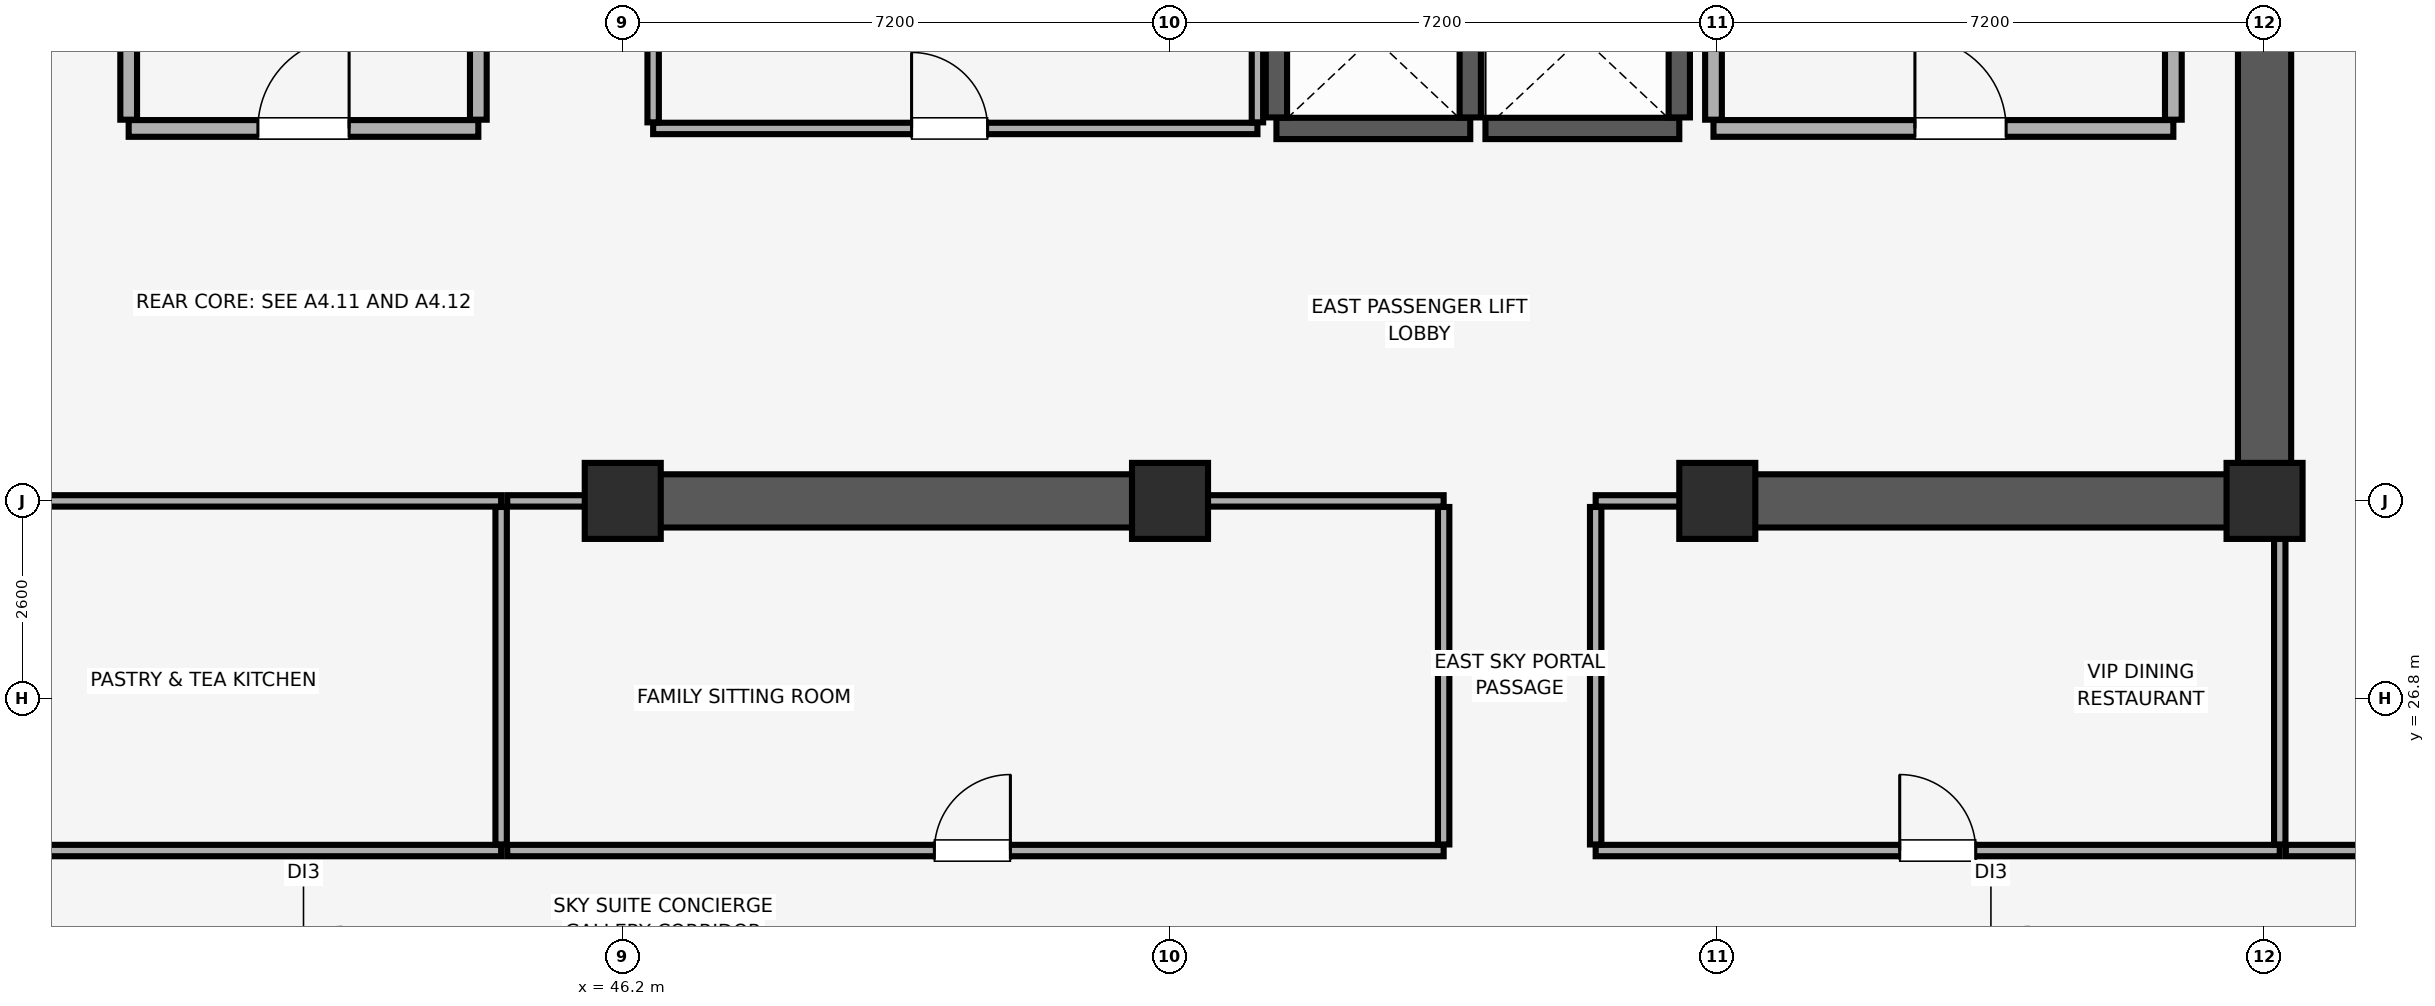
"""IFC4 building model, lengths in metres.
Left out: names, types, materials, properties, quantities, classifications, styles, units other than length and angle.
Written with IfcOpenShell. Run it as: python <this file> out.ifc"""

import sys

from ifc_helpers import new_model, si_unit, direction, frame, frame_2d, origin, origin_2d, place, context, subcontext, project, spatial, rectangle, extrude, element, fill, save


model = new_model("IFC4")
c1 = context("Model", 3, precision=1e-05, world=origin(), true_north=direction((0.0, 1.0)))
c2 = subcontext(c1, "Body", "Model", "MODEL_VIEW")
j1 = project(units=[si_unit("LENGTHUNIT", "METRE"), si_unit("PLANEANGLEUNIT", "RADIAN")], contexts=[c1])
p1 = place(None, origin())
s1 = spatial("IfcSite", under=j1, at=p1, CompositionType="ELEMENT")
p2 = place(p1, origin())
s2 = spatial("IfcBuilding", under=s1, at=p2, CompositionType="ELEMENT")
p3 = place(p2, frame((0.0, 0.0, 290.3)))
s3 = spatial("IfcBuildingStorey", under=s2, at=p3, CompositionType="ELEMENT", Elevation=290.3)
for number, where, z_axis, x_axis in (
    (1, (46.2, 29.4, 0.0), (0.0, 0.0, 1.0), (1.0, 0.0, 0.0)),
    (2, (53.4, 29.4, 0.0), (0.0, 0.0, 1.0), (1.0, 0.0, 0.0)),
    (3, (60.6, 29.4, 0.0), (0.0, 0.0, 1.0), (1.0, 0.0, 0.0)),
    (4, (67.8, 29.4, 0.0), (0.0, 0.0, 1.0), (1.0, 0.0, 0.0)),
):
    element("IfcColumn", number, at=place(p3, frame(where, z_axis=z_axis, x_axis=x_axis)), inside=s3, PredefinedType="COLUMN", context=c2, shape_type="SweptSolid", body=[
        extrude(rectangle(XDim=1.0, YDim=1.0, at=origin_2d()), origin(), (0.0, 0.0, 1.0), 4.02),
    ])
p4 = place(p3, frame((67.8, 29.4, 0.0), z_axis=(0.0, 0.0, 1.0), x_axis=(0.0, 1.0, 0.0)))
e5 = element("IfcWall", 5, at=p4, inside=s3, PredefinedType="SHEAR", context=c2, shape_type="SweptSolid", body=[
    extrude(rectangle(XDim=19.2, YDim=0.7, at=frame_2d((9.6, 0.0))), origin(), (0.0, 0.0, 1.0), 4.02),
])
p5 = place(p3, frame((46.0, 29.4, 0.0), z_axis=(0.0, 0.0, 1.0), x_axis=(1.0, 0.0, 0.0)))
e6 = element("IfcWall", 6, at=p5, inside=s3, PredefinedType="SHEAR", context=c2, shape_type="SweptSolid", body=[
    extrude(rectangle(XDim=7.6, YDim=0.7, at=frame_2d((3.8, 0.0))), origin(), (0.0, 0.0, 1.0), 4.02),
])
p6 = place(p3, frame((60.4, 29.4, 0.0), z_axis=(0.0, 0.0, 1.0), x_axis=(1.0, 0.0, 0.0)))
e7 = element("IfcWall", 7, at=p6, inside=s3, PredefinedType="SHEAR", context=c2, shape_type="SweptSolid", body=[
    extrude(rectangle(XDim=7.045, YDim=0.7, at=frame_2d((3.522, 0.0))), origin(), (0.0, 0.0, 1.0), 4.02),
])
p7 = place(p3, frame((54.8, 34.3, 0.0), z_axis=(0.0, 0.0, 1.0), x_axis=(1.0, 0.0, 0.0)))
e8 = element("IfcWall", 8, at=p7, inside=s3, PredefinedType="SHEAR", context=c2, shape_type="SweptSolid", body=[
    extrude(rectangle(XDim=2.55, YDim=0.28, at=frame_2d((1.275, 0.0))), origin(), (0.0, 0.0, 1.0), 4.02),
])
for number, where, z_axis, x_axis in (
    (9, (54.8, 34.445, 0.0), (0.0, 0.0, 1.0), (0.0, 1.0, 0.0)),
    (10, (57.35, 34.445, 0.0), (0.0, 0.0, 1.0), (0.0, 1.0, 0.0)),
):
    element("IfcWall", number, at=place(p3, frame(where, z_axis=z_axis, x_axis=x_axis)), inside=s3, PredefinedType="SHEAR", context=c2, shape_type="SweptSolid", body=[
        extrude(rectangle(XDim=2.11, YDim=0.28, at=frame_2d((1.055, 0.0))), origin(), (0.0, 0.0, 1.0), 4.02),
    ])
p8 = place(p3, frame((57.55, 34.3, 0.0), z_axis=(0.0, 0.0, 1.0), x_axis=(1.0, 0.0, 0.0)))
e11 = element("IfcWall", 11, at=p8, inside=s3, PredefinedType="SHEAR", context=c2, shape_type="SweptSolid", body=[
    extrude(rectangle(XDim=2.55, YDim=0.28, at=frame_2d((1.275, 0.0))), origin(), (0.0, 0.0, 1.0), 4.02),
])
p9 = place(p3, frame((60.1, 34.445, 0.0), z_axis=(0.0, 0.0, 1.0), x_axis=(0.0, 1.0, 0.0)))
e12 = element("IfcWall", 12, at=p9, inside=s3, PredefinedType="SHEAR", context=c2, shape_type="SweptSolid", body=[
    extrude(rectangle(XDim=2.11, YDim=0.28, at=frame_2d((1.055, 0.0))), origin(), (0.0, 0.0, 1.0), 4.02),
])
p10 = place(p3, frame((60.55, 34.3, 0.0), z_axis=(0.0, 0.0, 1.0), x_axis=(1.0, 0.0, 0.0)))
e13 = element("IfcWall", 13, at=p10, inside=s3, PredefinedType="PARTITIONING", context=c2, shape_type="SweptSolid", body=[
    extrude(rectangle(XDim=6.05, YDim=0.22, at=frame_2d((3.025, 0.0))), origin(), (0.0, 0.0, 1.0), 4.02),
])
p11 = place(p10, frame((2.65, 0.0, 0.0)))
e14 = element("IfcOpeningElement", 14, at=p11, cuts=e13, PredefinedType="OPENING", context=c2, shape_type="SweptSolid", body=[
    extrude(rectangle(XDim=1.2, YDim=2.15, at=frame_2d((0.6, 1.075))), frame((0.0, 0.12, 0.0), z_axis=(0.0, -1.0, 0.0), x_axis=(1.0, 0.0, 0.0)), (0.0, 0.0, 1.0), 0.24),
])
p12 = place(p3, frame((60.55, 34.415, 0.0), z_axis=(0.0, 0.0, 1.0), x_axis=(0.0, 1.0, 0.0)))
e15 = element("IfcWall", 15, at=p12, inside=s3, PredefinedType="PARTITIONING", context=c2, shape_type="SweptSolid", body=[
    extrude(rectangle(XDim=5.64, YDim=0.22, at=frame_2d((2.82, 0.0))), origin(), (0.0, 0.0, 1.0), 4.02),
])
p13 = place(p3, frame((66.6, 34.415, 0.0), z_axis=(0.0, 0.0, 1.0), x_axis=(0.0, 1.0, 0.0)))
e16 = element("IfcWall", 16, at=p13, inside=s3, PredefinedType="PARTITIONING", context=c2, shape_type="SweptSolid", body=[
    extrude(rectangle(XDim=5.43, YDim=0.22, at=frame_2d((2.715, 0.0))), origin(), (0.0, 0.0, 1.0), 4.02),
])
p14 = place(p3, frame((39.7, 34.3, 0.0), z_axis=(0.0, 0.0, 1.0), x_axis=(1.0, 0.0, 0.0)))
e17 = element("IfcWall", 17, at=p14, inside=s3, PredefinedType="PARTITIONING", context=c2, shape_type="SweptSolid", body=[
    extrude(rectangle(XDim=4.6, YDim=0.22, at=frame_2d((2.3, 0.0))), origin(), (0.0, 0.0, 1.0), 4.02),
])
p15 = place(p14, frame((1.7, 0.0, 0.0)))
e18 = element("IfcOpeningElement", 18, at=p15, cuts=e17, PredefinedType="OPENING", context=c2, shape_type="SweptSolid", body=[
    extrude(rectangle(XDim=1.2, YDim=2.15, at=frame_2d((0.6, 1.075))), frame((0.0, 0.12, 0.0), z_axis=(0.0, -1.0, 0.0), x_axis=(1.0, 0.0, 0.0)), (0.0, 0.0, 1.0), 0.24),
])
for number, where, z_axis, x_axis in (
    (19, (39.7, 34.415, 0.0), (0.0, 0.0, 1.0), (0.0, 1.0, 0.0)),
    (20, (44.3, 34.415, 0.0), (0.0, 0.0, 1.0), (0.0, 1.0, 0.0)),
):
    element("IfcWall", number, at=place(p3, frame(where, z_axis=z_axis, x_axis=x_axis)), inside=s3, PredefinedType="PARTITIONING", context=c2, shape_type="SweptSolid", body=[
        extrude(rectangle(XDim=5.785, YDim=0.22, at=frame_2d((2.893, 0.0))), origin(), (0.0, 0.0, 1.0), 4.02),
    ])
p16 = place(p3, frame((46.6, 34.3, 0.0), z_axis=(0.0, 0.0, 1.0), x_axis=(1.0, 0.0, 0.0)))
e21 = element("IfcWall", 21, at=p16, inside=s3, PredefinedType="PARTITIONING", context=c2, shape_type="SweptSolid", body=[
    extrude(rectangle(XDim=7.95, YDim=0.15, at=frame_2d((3.975, 0.0))), origin(), (0.0, 0.0, 1.0), 4.02),
])
p17 = place(p16, frame((3.4, 0.0, 0.0)))
e22 = element("IfcOpeningElement", 22, at=p17, cuts=e21, PredefinedType="OPENING", context=c2, shape_type="SweptSolid", body=[
    extrude(rectangle(XDim=1.0, YDim=2.15, at=frame_2d((0.5, 1.075))), frame((0.0, 0.085, 0.0), z_axis=(0.0, -1.0, 0.0), x_axis=(1.0, 0.0, 0.0)), (0.0, 0.0, 1.0), 0.17),
])
for number, where, z_axis, x_axis in (
    (23, (46.6, 34.38, 0.0), (0.0, 0.0, 1.0), (0.0, 1.0, 0.0)),
    (24, (54.55, 34.38, 0.0), (0.0, 0.0, 1.0), (0.0, 1.0, 0.0)),
):
    element("IfcWall", number, at=place(p3, frame(where, z_axis=z_axis, x_axis=x_axis)), inside=s3, PredefinedType="PARTITIONING", context=c2, shape_type="SweptSolid", body=[
        extrude(rectangle(XDim=4.94, YDim=0.15, at=frame_2d((2.47, 0.0))), origin(), (0.0, 0.0, 1.0), 4.02),
    ])
p18 = place(p3, frame((27.0, 24.8, 0.0), z_axis=(0.0, 0.0, 1.0), x_axis=(1.0, 0.0, 0.0)))
e25 = element("IfcWall", 25, at=p18, inside=s3, PredefinedType="PARTITIONING", context=c2, shape_type="SweptSolid", body=[
    extrude(rectangle(XDim=17.6, YDim=0.15, at=frame_2d((8.8, 0.0))), origin(), (0.0, 0.0, 1.0), 4.02),
])
p19 = place(p18, frame((8.3, 0.0, 0.0)))
e26 = element("IfcOpeningElement", 26, at=p19, cuts=e25, PredefinedType="OPENING", context=c2, shape_type="SweptSolid", body=[
    extrude(rectangle(XDim=1.0, YDim=2.15, at=frame_2d((0.5, 1.075))), frame((0.0, 0.085, 0.0), z_axis=(0.0, -1.0, 0.0), x_axis=(1.0, 0.0, 0.0)), (0.0, 0.0, 1.0), 0.17),
])
p20 = place(p3, frame((38.01, 29.4, 0.0), z_axis=(0.0, 0.0, 1.0), x_axis=(1.0, 0.0, 0.0)))
e27 = element("IfcWall", 27, at=p20, inside=s3, PredefinedType="PARTITIONING", context=c2, shape_type="SweptSolid", body=[
    extrude(rectangle(XDim=6.59, YDim=0.15, at=frame_2d((3.295, 0.0))), origin(), (0.0, 0.0, 1.0), 2.92),
])
p21 = place(p3, frame((44.6, 24.88, 0.0), z_axis=(0.0, 0.0, 1.0), x_axis=(0.0, 1.0, 0.0)))
e28 = element("IfcWall", 28, at=p21, inside=s3, PredefinedType="PARTITIONING", context=c2, shape_type="SweptSolid", body=[
    extrude(rectangle(XDim=4.44, YDim=0.15, at=frame_2d((2.22, 0.0))), origin(), (0.0, 0.0, 1.0), 4.02),
])
p22 = place(p3, frame((44.68, 24.8, 0.0), z_axis=(0.0, 0.0, 1.0), x_axis=(1.0, 0.0, 0.0)))
e29 = element("IfcWall", 29, at=p22, inside=s3, PredefinedType="PARTITIONING", context=c2, shape_type="SweptSolid", body=[
    extrude(rectangle(XDim=12.32, YDim=0.15, at=frame_2d((6.16, 0.0))), origin(), (0.0, 0.0, 1.0), 4.02),
])
p23 = place(p22, frame((5.62, 0.0, 0.0)))
e30 = element("IfcOpeningElement", 30, at=p23, cuts=e29, PredefinedType="OPENING", context=c2, shape_type="SweptSolid", body=[
    extrude(rectangle(XDim=1.0, YDim=2.15, at=frame_2d((0.5, 1.075))), frame((0.0, 0.085, 0.0), z_axis=(0.0, -1.0, 0.0), x_axis=(1.0, 0.0, 0.0)), (0.0, 0.0, 1.0), 0.17),
])
p24 = place(p3, frame((44.68, 29.4, 0.0), z_axis=(0.0, 0.0, 1.0), x_axis=(1.0, 0.0, 0.0)))
e31 = element("IfcWall", 31, at=p24, inside=s3, PredefinedType="PARTITIONING", context=c2, shape_type="SweptSolid", body=[
    extrude(rectangle(XDim=1.31, YDim=0.15, at=frame_2d((0.655, 0.0))), origin(), (0.0, 0.0, 1.0), 2.92),
])
p25 = place(p3, frame((53.61, 29.4, 0.0), z_axis=(0.0, 0.0, 1.0), x_axis=(1.0, 0.0, 0.0)))
e32 = element("IfcWall", 32, at=p25, inside=s3, PredefinedType="PARTITIONING", context=c2, shape_type="SweptSolid", body=[
    extrude(rectangle(XDim=3.39, YDim=0.15, at=frame_2d((1.695, 0.0))), origin(), (0.0, 0.0, 1.0), 2.92),
])
p26 = place(p3, frame((57.0, 24.88, 0.0), z_axis=(0.0, 0.0, 1.0), x_axis=(0.0, 1.0, 0.0)))
e33 = element("IfcWall", 33, at=p26, inside=s3, PredefinedType="PARTITIONING", context=c2, shape_type="SweptSolid", body=[
    extrude(rectangle(XDim=4.44, YDim=0.15, at=frame_2d((2.22, 0.0))), origin(), (0.0, 0.0, 1.0), 3.66),
])
p27 = place(p3, frame((59.0, 24.8, 0.0), z_axis=(0.0, 0.0, 1.0), x_axis=(1.0, 0.0, 0.0)))
e34 = element("IfcWall", 34, at=p27, inside=s3, PredefinedType="PARTITIONING", context=c2, shape_type="SweptSolid", body=[
    extrude(rectangle(XDim=9.0, YDim=0.15, at=frame_2d((4.5, 0.0))), origin(), (0.0, 0.0, 1.0), 4.02),
])
p28 = place(p27, frame((4.0, 0.0, 0.0)))
e35 = element("IfcOpeningElement", 35, at=p28, cuts=e34, PredefinedType="OPENING", context=c2, shape_type="SweptSolid", body=[
    extrude(rectangle(XDim=1.0, YDim=2.15, at=frame_2d((0.5, 1.075))), frame((0.0, 0.085, 0.0), z_axis=(0.0, -1.0, 0.0), x_axis=(1.0, 0.0, 0.0)), (0.0, 0.0, 1.0), 0.17),
])
p29 = place(p3, frame((59.0, 29.4, 0.0), z_axis=(0.0, 0.0, 1.0), x_axis=(1.0, 0.0, 0.0)))
e36 = element("IfcWall", 36, at=p29, inside=s3, PredefinedType="PARTITIONING", context=c2, shape_type="SweptSolid", body=[
    extrude(rectangle(XDim=1.39, YDim=0.15, at=frame_2d((0.695, 0.0))), origin(), (0.0, 0.0, 1.0), 2.92),
])
p30 = place(p3, frame((59.0, 24.88, 0.0), z_axis=(0.0, 0.0, 1.0), x_axis=(0.0, 1.0, 0.0)))
e37 = element("IfcWall", 37, at=p30, inside=s3, PredefinedType="PARTITIONING", context=c2, shape_type="SweptSolid", body=[
    extrude(rectangle(XDim=4.44, YDim=0.15, at=frame_2d((2.22, 0.0))), origin(), (0.0, 0.0, 1.0), 4.02),
])
p31 = place(p3, frame((68.0, 24.88, 0.0), z_axis=(0.0, 0.0, 1.0), x_axis=(0.0, 1.0, 0.0)))
e38 = element("IfcWall", 38, at=p31, inside=s3, PredefinedType="PARTITIONING", context=c2, shape_type="SweptSolid", body=[
    extrude(rectangle(XDim=4.51, YDim=0.15, at=frame_2d((2.255, 0.0))), origin(), (0.0, 0.0, 1.0), 3.66),
])
p32 = place(p3, frame((68.08, 24.8, 0.0), z_axis=(0.0, 0.0, 1.0), x_axis=(1.0, 0.0, 0.0)))
e39 = element("IfcWall", 39, at=p32, inside=s3, PredefinedType="PARTITIONING", context=c2, shape_type="SweptSolid", body=[
    extrude(rectangle(XDim=6.77, YDim=0.15, at=frame_2d((3.385, 0.0))), origin(), (0.0, 0.0, 1.0), 4.02),
])
p33 = place(p32, frame((1.0, 0.0, 0.0)))
e40 = element("IfcOpeningElement", 40, at=p33, cuts=e39, PredefinedType="OPENING", context=c2, shape_type="SweptSolid", body=[
    extrude(rectangle(XDim=1.0, YDim=2.15, at=frame_2d((0.5, 1.075))), frame((0.0, 0.085, 0.0), z_axis=(0.0, -1.0, 0.0), x_axis=(1.0, 0.0, 0.0)), (0.0, 0.0, 1.0), 0.17),
])
p34 = place(p11, origin())
e41 = element("IfcDoor", 41, at=p34, inside=s3, OperationType="SINGLE_SWING_LEFT", PredefinedType="DOOR", context=c2, shape_type="SweptSolid", body=[
    extrude(rectangle(XDim=1.2, YDim=2.15, at=frame_2d((0.6, 1.075))), frame((0.0, 0.025, 0.0), z_axis=(0.0, -1.0, 0.0), x_axis=(1.0, 0.0, 0.0)), (0.0, 0.0, 1.0), 0.05),
])
fill(e14, e41)
p35 = place(p15, origin())
e42 = element("IfcDoor", 42, at=p35, inside=s3, OperationType="SINGLE_SWING_RIGHT", PredefinedType="DOOR", context=c2, shape_type="SweptSolid", body=[
    extrude(rectangle(XDim=1.2, YDim=2.15, at=frame_2d((0.6, 1.075))), frame((0.0, 0.025, 0.0), z_axis=(0.0, -1.0, 0.0), x_axis=(1.0, 0.0, 0.0)), (0.0, 0.0, 1.0), 0.05),
])
fill(e18, e42)
p36 = place(p17, origin())
e43 = element("IfcDoor", 43, at=p36, inside=s3, OperationType="SINGLE_SWING_LEFT", PredefinedType="DOOR", context=c2, shape_type="SweptSolid", body=[
    extrude(rectangle(XDim=1.0, YDim=2.15, at=frame_2d((0.5, 1.075))), frame((0.0, 0.025, 0.0), z_axis=(0.0, -1.0, 0.0), x_axis=(1.0, 0.0, 0.0)), (0.0, 0.0, 1.0), 0.05),
])
fill(e22, e43)
p37 = place(p23, origin())
e44 = element("IfcDoor", 44, at=p37, inside=s3, OperationType="SINGLE_SWING_RIGHT", PredefinedType="DOOR", context=c2, shape_type="SweptSolid", body=[
    extrude(rectangle(XDim=1.0, YDim=2.15, at=frame_2d((0.5, 1.075))), frame((0.0, 0.025, 0.0), z_axis=(0.0, -1.0, 0.0), x_axis=(1.0, 0.0, 0.0)), (0.0, 0.0, 1.0), 0.05),
])
fill(e30, e44)
p38 = place(p28, origin())
e45 = element("IfcDoor", 45, at=p38, inside=s3, OperationType="SINGLE_SWING_LEFT", PredefinedType="DOOR", context=c2, shape_type="SweptSolid", body=[
    extrude(rectangle(XDim=1.0, YDim=2.15, at=frame_2d((0.5, 1.075))), frame((0.0, 0.025, 0.0), z_axis=(0.0, -1.0, 0.0), x_axis=(1.0, 0.0, 0.0)), (0.0, 0.0, 1.0), 0.05),
])
fill(e35, e45)
save(model, sys.argv[1])
